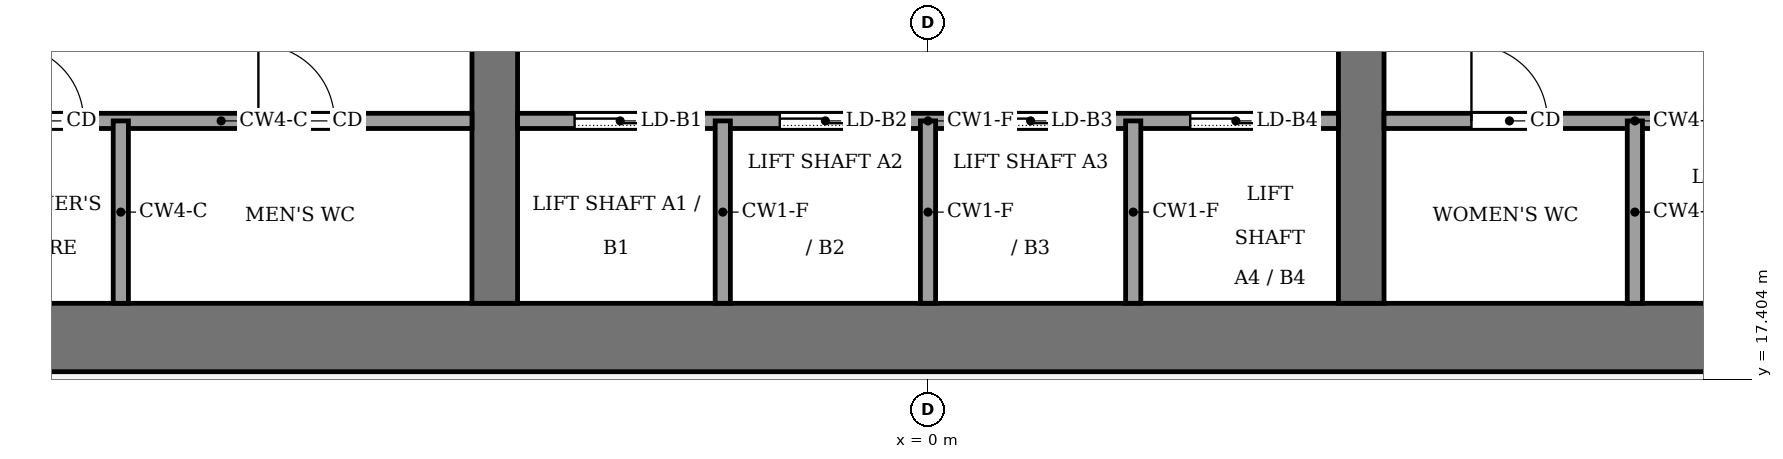
"""IFC4 building model, lengths in metres.
Left out: names, types, materials, properties, quantities, classifications, styles, units other than length and angle.
Written with IfcOpenShell. Run it as: python <this file> out.ifc"""

import sys

from ifc_helpers import new_model, si_unit, direction, frame, frame_2d, origin, place, context, subcontext, project, spatial, rectangle, extrude, element, fill, save


model = new_model("IFC4")
c1 = context("Model", 3, precision=1e-05, world=origin(), true_north=direction((0.0, 1.0)))
c2 = subcontext(c1, "Body", "Model", "MODEL_VIEW")
j1 = project(units=[si_unit("LENGTHUNIT", "METRE"), si_unit("PLANEANGLEUNIT", "RADIAN")], contexts=[c1])
p1 = place(None, origin())
s1 = spatial("IfcSite", under=j1, at=p1, CompositionType="ELEMENT")
p2 = place(p1, origin())
s2 = spatial("IfcBuilding", under=s1, at=p2, CompositionType="ELEMENT")
p3 = place(p2, frame((0.0, 0.0, 210.0)))
s3 = spatial("IfcBuildingStorey", under=s2, at=p3, CompositionType="ELEMENT", Elevation=210.0)
p4 = place(p3, frame((-13.5, 17.95, -0.13), z_axis=(0.0, 0.0, 1.0), x_axis=(1.0, 0.0, 0.0)))
e1 = element("IfcWall", 1, at=p4, inside=s3, PredefinedType="SHEAR", context=c2, shape_type="SweptSolid", body=[
    extrude(rectangle(XDim=27.0, YDim=0.9, at=frame_2d((13.5, 0.0))), origin(), (0.0, 0.0, 1.0), 4.0),
])
p5 = place(p3, frame((-5.7, 18.4, -0.13), z_axis=(0.0, 0.0, 1.0), x_axis=(0.0, 1.0, 0.0)))
e2 = element("IfcWall", 2, at=p5, inside=s3, PredefinedType="SHEAR", context=c2, shape_type="SweptSolid", body=[
    extrude(rectangle(XDim=19.2, YDim=0.6, at=frame_2d((9.6, 0.0))), origin(), (0.0, 0.0, 1.0), 4.0),
])
p6 = place(p5, frame((8.35, 0.0, 0.13)))
e3 = element("IfcOpeningElement", 3, at=p6, cuts=e2, PredefinedType="OPENING", context=c2, shape_type="SweptSolid", body=[
    extrude(rectangle(XDim=0.9, YDim=2.1, at=frame_2d((0.45, 1.05))), frame((0.0, 0.31, 0.0), z_axis=(0.0, -1.0, 0.0), x_axis=(1.0, 0.0, 0.0)), (0.0, 0.0, 1.0), 0.62),
])
p7 = place(p3, frame((5.7, 18.4, -0.13), z_axis=(0.0, 0.0, 1.0), x_axis=(0.0, 1.0, 0.0)))
e4 = element("IfcWall", 4, at=p7, inside=s3, PredefinedType="SHEAR", context=c2, shape_type="SweptSolid", body=[
    extrude(rectangle(XDim=19.2, YDim=0.6, at=frame_2d((9.6, 0.0))), origin(), (0.0, 0.0, 1.0), 4.0),
])
p8 = place(p7, frame((13.3, 0.0, 0.13)))
e5 = element("IfcOpeningElement", 5, at=p8, cuts=e4, PredefinedType="OPENING", context=c2, shape_type="SweptSolid", body=[
    extrude(rectangle(XDim=2.4, YDim=2.4, at=frame_2d((1.2, 1.2))), frame((0.0, 0.31, 0.0), z_axis=(0.0, -1.0, 0.0), x_axis=(1.0, 0.0, 0.0)), (0.0, 0.0, 1.0), 0.62),
])
p9 = place(p3, frame((-12.6, 20.8, 0.0), z_axis=(0.0, 0.0, 1.0), x_axis=(1.0, 0.0, 0.0)))
e6 = element("IfcWall", 6, at=p9, inside=s3, PredefinedType="PARTITIONING", context=c2, shape_type="SweptSolid", body=[
    extrude(rectangle(XDim=6.6, YDim=0.2, at=frame_2d((3.3, 0.0))), origin(), (0.0, 0.0, 1.0), 3.87),
])
p10 = place(p9, frame((0.49, 0.0, 0.0)))
e7 = element("IfcOpeningElement", 7, at=p10, cuts=e6, PredefinedType="OPENING", context=c2, shape_type="SweptSolid", body=[
    extrude(rectangle(XDim=1.0, YDim=2.1, at=frame_2d((0.5, 1.05))), frame((0.0, 0.11, 0.0), z_axis=(0.0, -1.0, 0.0), x_axis=(1.0, 0.0, 0.0)), (0.0, 0.0, 1.0), 0.22),
])
p11 = place(p9, frame((3.79, 0.0, 0.0)))
e8 = element("IfcOpeningElement", 8, at=p11, cuts=e6, PredefinedType="OPENING", context=c2, shape_type="SweptSolid", body=[
    extrude(rectangle(XDim=1.0, YDim=2.1, at=frame_2d((0.5, 1.05))), frame((0.0, 0.11, 0.0), z_axis=(0.0, -1.0, 0.0), x_axis=(1.0, 0.0, 0.0)), (0.0, 0.0, 1.0), 0.22),
])
p12 = place(p3, frame((-5.4, 20.8, 0.0), z_axis=(0.0, 0.0, 1.0), x_axis=(1.0, 0.0, 0.0)))
e9 = element("IfcWall", 9, at=p12, inside=s3, PredefinedType="PARTITIONING", context=c2, shape_type="SweptSolid", body=[
    extrude(rectangle(XDim=10.8, YDim=0.2, at=frame_2d((5.4, 0.0))), origin(), (0.0, 0.0, 1.0), 3.87),
])
p13 = place(p12, frame((0.75, 0.0, 0.0)))
e10 = element("IfcOpeningElement", 10, at=p13, cuts=e9, PredefinedType="OPENING", context=c2, shape_type="SweptSolid", body=[
    extrude(rectangle(XDim=1.2, YDim=2.2, at=frame_2d((0.6, 1.1))), frame((0.0, 0.11, 0.0), z_axis=(0.0, -1.0, 0.0), x_axis=(1.0, 0.0, 0.0)), (0.0, 0.0, 1.0), 0.22),
])
p14 = place(p12, frame((3.45, 0.0, 0.0)))
e11 = element("IfcOpeningElement", 11, at=p14, cuts=e9, PredefinedType="OPENING", context=c2, shape_type="SweptSolid", body=[
    extrude(rectangle(XDim=1.2, YDim=2.2, at=frame_2d((0.6, 1.1))), frame((0.0, 0.11, 0.0), z_axis=(0.0, -1.0, 0.0), x_axis=(1.0, 0.0, 0.0)), (0.0, 0.0, 1.0), 0.22),
])
p15 = place(p12, frame((6.15, 0.0, 0.0)))
e12 = element("IfcOpeningElement", 12, at=p15, cuts=e9, PredefinedType="OPENING", context=c2, shape_type="SweptSolid", body=[
    extrude(rectangle(XDim=1.2, YDim=2.2, at=frame_2d((0.6, 1.1))), frame((0.0, 0.11, 0.0), z_axis=(0.0, -1.0, 0.0), x_axis=(1.0, 0.0, 0.0)), (0.0, 0.0, 1.0), 0.22),
])
p16 = place(p12, frame((8.85, 0.0, 0.0)))
e13 = element("IfcOpeningElement", 13, at=p16, cuts=e9, PredefinedType="OPENING", context=c2, shape_type="SweptSolid", body=[
    extrude(rectangle(XDim=1.2, YDim=2.2, at=frame_2d((0.6, 1.1))), frame((0.0, 0.11, 0.0), z_axis=(0.0, -1.0, 0.0), x_axis=(1.0, 0.0, 0.0)), (0.0, 0.0, 1.0), 0.22),
])
p17 = place(p3, frame((6.0, 20.8, 0.0), z_axis=(0.0, 0.0, 1.0), x_axis=(1.0, 0.0, 0.0)))
e14 = element("IfcWall", 14, at=p17, inside=s3, PredefinedType="PARTITIONING", context=c2, shape_type="SweptSolid", body=[
    extrude(rectangle(XDim=6.6, YDim=0.2, at=frame_2d((3.3, 0.0))), origin(), (0.0, 0.0, 1.0), 3.87),
])
p18 = place(p17, frame((1.15, 0.0, 0.0)))
e15 = element("IfcOpeningElement", 15, at=p18, cuts=e14, PredefinedType="OPENING", context=c2, shape_type="SweptSolid", body=[
    extrude(rectangle(XDim=1.0, YDim=2.1, at=frame_2d((0.5, 1.05))), frame((0.0, 0.11, 0.0), z_axis=(0.0, -1.0, 0.0), x_axis=(1.0, 0.0, 0.0)), (0.0, 0.0, 1.0), 0.22),
])
p19 = place(p17, frame((4.45, 0.0, 0.0)))
e16 = element("IfcOpeningElement", 16, at=p19, cuts=e14, PredefinedType="OPENING", context=c2, shape_type="SweptSolid", body=[
    extrude(rectangle(XDim=1.0, YDim=2.1, at=frame_2d((0.5, 1.05))), frame((0.0, 0.11, 0.0), z_axis=(0.0, -1.0, 0.0), x_axis=(1.0, 0.0, 0.0)), (0.0, 0.0, 1.0), 0.22),
])
for number, where, z_axis, x_axis in (
    (17, (-10.62, 18.4, 0.0), (0.0, 0.0, 1.0), (0.0, 1.0, 0.0)),
    (18, (-2.7, 18.4, 0.0), (0.0, 0.0, 1.0), (0.0, 1.0, 0.0)),
    (19, (0.0, 18.4, 0.0), (0.0, 0.0, 1.0), (0.0, 1.0, 0.0)),
    (20, (2.7, 18.4, 0.0), (0.0, 0.0, 1.0), (0.0, 1.0, 0.0)),
    (21, (9.3, 18.4, 0.0), (0.0, 0.0, 1.0), (0.0, 1.0, 0.0)),
):
    element("IfcWall", number, at=place(p3, frame(where, z_axis=z_axis, x_axis=x_axis)), inside=s3, PredefinedType="PARTITIONING", context=c2, shape_type="SweptSolid", body=[
        extrude(rectangle(XDim=2.4, YDim=0.2, at=frame_2d((1.2, 0.0))), origin(), (0.0, 0.0, 1.0), 3.87),
    ])
p20 = place(p13, origin())
e22 = element("IfcDoor", 22, at=p20, inside=s3, OperationType="SLIDING_TO_LEFT", PredefinedType="DOOR", context=c2, shape_type="SweptSolid", body=[
    extrude(rectangle(XDim=1.2, YDim=2.2, at=frame_2d((0.6, 1.1))), frame((0.0, 0.025, 0.0), z_axis=(0.0, -1.0, 0.0), x_axis=(1.0, 0.0, 0.0)), (0.0, 0.0, 1.0), 0.05),
])
fill(e10, e22)
p21 = place(p14, origin())
e23 = element("IfcDoor", 23, at=p21, inside=s3, OperationType="SLIDING_TO_LEFT", PredefinedType="DOOR", context=c2, shape_type="SweptSolid", body=[
    extrude(rectangle(XDim=1.2, YDim=2.2, at=frame_2d((0.6, 1.1))), frame((0.0, 0.025, 0.0), z_axis=(0.0, -1.0, 0.0), x_axis=(1.0, 0.0, 0.0)), (0.0, 0.0, 1.0), 0.05),
])
fill(e11, e23)
p22 = place(p15, origin())
e24 = element("IfcDoor", 24, at=p22, inside=s3, OperationType="SLIDING_TO_LEFT", PredefinedType="DOOR", context=c2, shape_type="SweptSolid", body=[
    extrude(rectangle(XDim=1.2, YDim=2.2, at=frame_2d((0.6, 1.1))), frame((0.0, 0.025, 0.0), z_axis=(0.0, -1.0, 0.0), x_axis=(1.0, 0.0, 0.0)), (0.0, 0.0, 1.0), 0.05),
])
fill(e12, e24)
p23 = place(p16, origin())
e25 = element("IfcDoor", 25, at=p23, inside=s3, OperationType="SLIDING_TO_LEFT", PredefinedType="DOOR", context=c2, shape_type="SweptSolid", body=[
    extrude(rectangle(XDim=1.2, YDim=2.2, at=frame_2d((0.6, 1.1))), frame((0.0, 0.025, 0.0), z_axis=(0.0, -1.0, 0.0), x_axis=(1.0, 0.0, 0.0)), (0.0, 0.0, 1.0), 0.05),
])
fill(e13, e25)
p24 = place(p10, origin())
e26 = element("IfcDoor", 26, at=p24, inside=s3, OperationType="SINGLE_SWING_RIGHT", PredefinedType="DOOR", context=c2, shape_type="SweptSolid", body=[
    extrude(rectangle(XDim=1.0, YDim=2.1, at=frame_2d((0.5, 1.05))), frame((0.0, 0.025, 0.0), z_axis=(0.0, -1.0, 0.0), x_axis=(1.0, 0.0, 0.0)), (0.0, 0.0, 1.0), 0.05),
])
fill(e7, e26)
p25 = place(p11, origin())
e27 = element("IfcDoor", 27, at=p25, inside=s3, OperationType="SINGLE_SWING_RIGHT", PredefinedType="DOOR", context=c2, shape_type="SweptSolid", body=[
    extrude(rectangle(XDim=1.0, YDim=2.1, at=frame_2d((0.5, 1.05))), frame((0.0, 0.025, 0.0), z_axis=(0.0, -1.0, 0.0), x_axis=(1.0, 0.0, 0.0)), (0.0, 0.0, 1.0), 0.05),
])
fill(e8, e27)
p26 = place(p18, origin())
e28 = element("IfcDoor", 28, at=p26, inside=s3, OperationType="SINGLE_SWING_LEFT", PredefinedType="DOOR", context=c2, shape_type="SweptSolid", body=[
    extrude(rectangle(XDim=1.0, YDim=2.1, at=frame_2d((0.5, 1.05))), frame((0.0, 0.025, 0.0), z_axis=(0.0, -1.0, 0.0), x_axis=(1.0, 0.0, 0.0)), (0.0, 0.0, 1.0), 0.05),
])
fill(e15, e28)
save(model, sys.argv[1])
